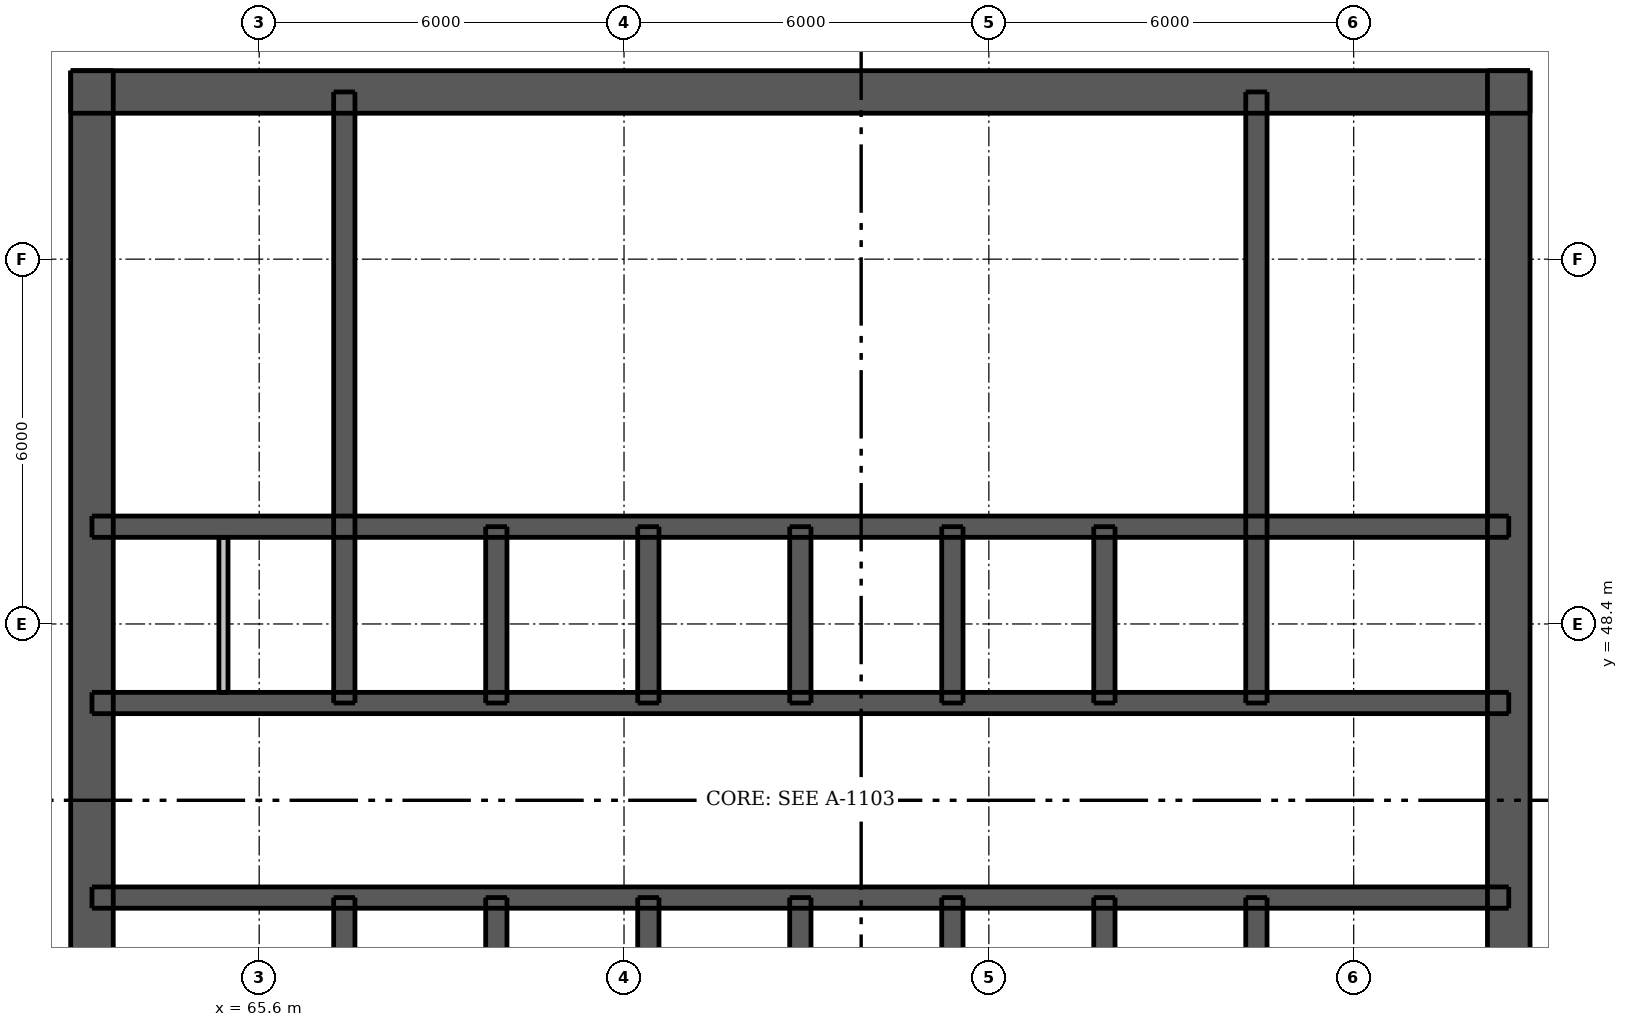
"""IFC4 building model, lengths in metres.
Left out: names, types, materials, properties, quantities, classifications, styles, units other than length and angle.
Written with IfcOpenShell. Run it as: python <this file> out.ifc"""

import sys

from ifc_helpers import new_model, si_unit, direction, frame, frame_2d, origin, place, context, subcontext, project, spatial, rectangle, extrude, element, fill, save


model = new_model("IFC4")
c1 = context("Model", 3, precision=1e-05, world=origin(), true_north=direction((0.0, 1.0)))
c2 = subcontext(c1, "Body", "Model", "MODEL_VIEW")
j1 = project(units=[si_unit("LENGTHUNIT", "METRE"), si_unit("PLANEANGLEUNIT", "RADIAN")], contexts=[c1])
p1 = place(None, origin())
s1 = spatial("IfcSite", under=j1, at=p1, CompositionType="ELEMENT")
p2 = place(p1, origin())
s2 = spatial("IfcBuilding", under=s1, at=p2, CompositionType="ELEMENT")
p3 = place(p2, frame((0.0, 0.0, 158.2)))
s3 = spatial("IfcBuildingStorey", under=s2, at=p3, CompositionType="ELEMENT", Elevation=158.2)
p4 = place(p3, frame((62.5, 57.15, 0.0), z_axis=(0.0, 0.0, 1.0), x_axis=(1.0, 0.0, 0.0)))
e1 = element("IfcWall", 1, at=p4, inside=s3, PredefinedType="SHEAR", context=c2, shape_type="SweptSolid", body=[
    extrude(rectangle(XDim=24.0, YDim=0.7, at=frame_2d((12.0, 0.0))), origin(), (0.0, 0.0, 1.0), 3.05),
])
p5 = place(p4, frame((20.938, 0.0, 0.0)))
e2 = element("IfcOpeningElement", 2, at=p5, cuts=e1, PredefinedType="OPENING", context=c2, shape_type="SweptSolid", body=[
    extrude(rectangle(XDim=1.1, YDim=2.1, at=frame_2d((0.55, 1.05))), frame((0.0, 0.36, 0.0), z_axis=(0.0, -1.0, 0.0), x_axis=(1.0, 0.0, 0.0)), (0.0, 0.0, 1.0), 0.72),
])
p6 = place(p4, frame((1.962, 0.0, 0.0)))
e3 = element("IfcOpeningElement", 3, at=p6, cuts=e1, PredefinedType="OPENING", context=c2, shape_type="SweptSolid", body=[
    extrude(rectangle(XDim=1.1, YDim=2.1, at=frame_2d((0.55, 1.05))), frame((0.0, 0.36, 0.0), z_axis=(0.0, -1.0, 0.0), x_axis=(1.0, 0.0, 0.0)), (0.0, 0.0, 1.0), 0.72),
])
p7 = place(p4, frame((11.55, 0.0, 0.0)))
e4 = element("IfcOpeningElement", 4, at=p7, cuts=e1, PredefinedType="OPENING", context=c2, shape_type="SweptSolid", body=[
    extrude(rectangle(XDim=0.9, YDim=2.1, at=frame_2d((0.45, 1.05))), frame((0.0, 0.36, 0.0), z_axis=(0.0, -1.0, 0.0), x_axis=(1.0, 0.0, 0.0)), (0.0, 0.0, 1.0), 0.72),
])
p8 = place(p3, frame((62.85, 33.5, 0.0), z_axis=(0.0, 0.0, 1.0), x_axis=(0.0, 1.0, 0.0)))
e5 = element("IfcWall", 5, at=p8, inside=s3, PredefinedType="SHEAR", context=c2, shape_type="SweptSolid", body=[
    extrude(rectangle(XDim=24.0, YDim=0.7, at=frame_2d((12.0, 0.0))), origin(), (0.0, 0.0, 1.0), 3.05),
])
p9 = place(p8, frame((11.2, 0.0, 0.0)))
e6 = element("IfcOpeningElement", 6, at=p9, cuts=e5, PredefinedType="OPENING", context=c2, shape_type="SweptSolid", body=[
    extrude(rectangle(XDim=1.6, YDim=2.1, at=frame_2d((0.8, 1.05))), frame((0.0, 0.36, 0.0), z_axis=(0.0, -1.0, 0.0), x_axis=(1.0, 0.0, 0.0)), (0.0, 0.0, 1.0), 0.72),
])
p10 = place(p3, frame((86.15, 33.5, 0.0), z_axis=(0.0, 0.0, 1.0), x_axis=(0.0, 1.0, 0.0)))
e7 = element("IfcWall", 7, at=p10, inside=s3, PredefinedType="SHEAR", context=c2, shape_type="SweptSolid", body=[
    extrude(rectangle(XDim=24.0, YDim=0.7, at=frame_2d((12.0, 0.0))), origin(), (0.0, 0.0, 1.0), 3.05),
])
p11 = place(p10, frame((11.2, 0.0, 0.0)))
e8 = element("IfcOpeningElement", 8, at=p11, cuts=e7, PredefinedType="OPENING", context=c2, shape_type="SweptSolid", body=[
    extrude(rectangle(XDim=1.6, YDim=2.1, at=frame_2d((0.8, 1.05))), frame((0.0, 0.36, 0.0), z_axis=(0.0, -1.0, 0.0), x_axis=(1.0, 0.0, 0.0)), (0.0, 0.0, 1.0), 0.72),
])
p12 = place(p3, frame((62.85, 43.9, 0.0), z_axis=(0.0, 0.0, 1.0), x_axis=(1.0, 0.0, 0.0)))
e9 = element("IfcWall", 9, at=p12, inside=s3, PredefinedType="SHEAR", context=c2, shape_type="SweptSolid", body=[
    extrude(rectangle(XDim=23.3, YDim=0.35, at=frame_2d((11.65, 0.0))), origin(), (0.0, 0.0, 1.0), 3.05),
])
p13 = place(p12, frame((1.712, 0.0, 0.0)))
e10 = element("IfcOpeningElement", 10, at=p13, cuts=e9, PredefinedType="OPENING", context=c2, shape_type="SweptSolid", body=[
    extrude(rectangle(XDim=0.9, YDim=2.1, at=frame_2d((0.45, 1.05))), frame((0.0, 0.185, 0.0), z_axis=(0.0, -1.0, 0.0), x_axis=(1.0, 0.0, 0.0)), (0.0, 0.0, 1.0), 0.37),
])
p14 = place(p12, frame((20.688, 0.0, 0.0)))
e11 = element("IfcOpeningElement", 11, at=p14, cuts=e9, PredefinedType="OPENING", context=c2, shape_type="SweptSolid", body=[
    extrude(rectangle(XDim=0.9, YDim=2.1, at=frame_2d((0.45, 1.05))), frame((0.0, 0.185, 0.0), z_axis=(0.0, -1.0, 0.0), x_axis=(1.0, 0.0, 0.0)), (0.0, 0.0, 1.0), 0.37),
])
p15 = place(p12, frame((4.95, 0.0, 0.0)))
e12 = element("IfcOpeningElement", 12, at=p15, cuts=e9, PredefinedType="OPENING", context=c2, shape_type="SweptSolid", body=[
    extrude(rectangle(XDim=0.9, YDim=2.1, at=frame_2d((0.45, 1.05))), frame((0.0, 0.185, 0.0), z_axis=(0.0, -1.0, 0.0), x_axis=(1.0, 0.0, 0.0)), (0.0, 0.0, 1.0), 0.37),
])
p16 = place(p12, frame((9.95, 0.0, 0.0)))
e13 = element("IfcOpeningElement", 13, at=p16, cuts=e9, PredefinedType="OPENING", context=c2, shape_type="SweptSolid", body=[
    extrude(rectangle(XDim=0.9, YDim=2.1, at=frame_2d((0.45, 1.05))), frame((0.0, 0.185, 0.0), z_axis=(0.0, -1.0, 0.0), x_axis=(1.0, 0.0, 0.0)), (0.0, 0.0, 1.0), 0.37),
])
p17 = place(p12, frame((12.45, 0.0, 0.0)))
e14 = element("IfcOpeningElement", 14, at=p17, cuts=e9, PredefinedType="OPENING", context=c2, shape_type="SweptSolid", body=[
    extrude(rectangle(XDim=0.9, YDim=2.1, at=frame_2d((0.45, 1.05))), frame((0.0, 0.185, 0.0), z_axis=(0.0, -1.0, 0.0), x_axis=(1.0, 0.0, 0.0)), (0.0, 0.0, 1.0), 0.37),
])
p18 = place(p12, frame((17.45, 0.0, 0.0)))
e15 = element("IfcOpeningElement", 15, at=p18, cuts=e9, PredefinedType="OPENING", context=c2, shape_type="SweptSolid", body=[
    extrude(rectangle(XDim=0.9, YDim=2.1, at=frame_2d((0.45, 1.05))), frame((0.0, 0.185, 0.0), z_axis=(0.0, -1.0, 0.0), x_axis=(1.0, 0.0, 0.0)), (0.0, 0.0, 1.0), 0.37),
])
p19 = place(p3, frame((62.85, 47.1, 0.0), z_axis=(0.0, 0.0, 1.0), x_axis=(1.0, 0.0, 0.0)))
e16 = element("IfcWall", 16, at=p19, inside=s3, PredefinedType="SHEAR", context=c2, shape_type="SweptSolid", body=[
    extrude(rectangle(XDim=23.3, YDim=0.35, at=frame_2d((11.65, 0.0))), origin(), (0.0, 0.0, 1.0), 3.05),
])
p20 = place(p19, frame((0.806, 0.0, 0.0)))
e17 = element("IfcOpeningElement", 17, at=p20, cuts=e16, PredefinedType="OPENING", context=c2, shape_type="SweptSolid", body=[
    extrude(rectangle(XDim=0.9, YDim=2.1, at=frame_2d((0.45, 1.05))), frame((0.0, 0.185, 0.0), z_axis=(0.0, -1.0, 0.0), x_axis=(1.0, 0.0, 0.0)), (0.0, 0.0, 1.0), 0.37),
])
p21 = place(p19, frame((2.619, 0.0, 0.0)))
e18 = element("IfcOpeningElement", 18, at=p21, cuts=e16, PredefinedType="OPENING", context=c2, shape_type="SweptSolid", body=[
    extrude(rectangle(XDim=0.9, YDim=2.1, at=frame_2d((0.45, 1.05))), frame((0.0, 0.185, 0.0), z_axis=(0.0, -1.0, 0.0), x_axis=(1.0, 0.0, 0.0)), (0.0, 0.0, 1.0), 0.37),
])
p22 = place(p19, frame((20.688, 0.0, 0.0)))
e19 = element("IfcOpeningElement", 19, at=p22, cuts=e16, PredefinedType="OPENING", context=c2, shape_type="SweptSolid", body=[
    extrude(rectangle(XDim=0.9, YDim=2.1, at=frame_2d((0.45, 1.05))), frame((0.0, 0.185, 0.0), z_axis=(0.0, -1.0, 0.0), x_axis=(1.0, 0.0, 0.0)), (0.0, 0.0, 1.0), 0.37),
])
p23 = place(p19, frame((4.85, 0.0, 0.0)))
e20 = element("IfcOpeningElement", 20, at=p23, cuts=e16, PredefinedType="OPENING", context=c2, shape_type="SweptSolid", body=[
    extrude(rectangle(XDim=1.1, YDim=2.1, at=frame_2d((0.55, 1.05))), frame((0.0, 0.185, 0.0), z_axis=(0.0, -1.0, 0.0), x_axis=(1.0, 0.0, 0.0)), (0.0, 0.0, 1.0), 0.37),
])
p24 = place(p19, frame((7.35, 0.0, 0.0)))
e21 = element("IfcOpeningElement", 21, at=p24, cuts=e16, PredefinedType="OPENING", context=c2, shape_type="SweptSolid", body=[
    extrude(rectangle(XDim=1.1, YDim=2.1, at=frame_2d((0.55, 1.05))), frame((0.0, 0.185, 0.0), z_axis=(0.0, -1.0, 0.0), x_axis=(1.0, 0.0, 0.0)), (0.0, 0.0, 1.0), 0.37),
])
p25 = place(p19, frame((9.85, 0.0, 0.0)))
e22 = element("IfcOpeningElement", 22, at=p25, cuts=e16, PredefinedType="OPENING", context=c2, shape_type="SweptSolid", body=[
    extrude(rectangle(XDim=1.1, YDim=2.1, at=frame_2d((0.55, 1.05))), frame((0.0, 0.185, 0.0), z_axis=(0.0, -1.0, 0.0), x_axis=(1.0, 0.0, 0.0)), (0.0, 0.0, 1.0), 0.37),
])
p26 = place(p19, frame((12.35, 0.0, 0.0)))
e23 = element("IfcOpeningElement", 23, at=p26, cuts=e16, PredefinedType="OPENING", context=c2, shape_type="SweptSolid", body=[
    extrude(rectangle(XDim=1.1, YDim=2.1, at=frame_2d((0.55, 1.05))), frame((0.0, 0.185, 0.0), z_axis=(0.0, -1.0, 0.0), x_axis=(1.0, 0.0, 0.0)), (0.0, 0.0, 1.0), 0.37),
])
p27 = place(p19, frame((14.85, 0.0, 0.0)))
e24 = element("IfcOpeningElement", 24, at=p27, cuts=e16, PredefinedType="OPENING", context=c2, shape_type="SweptSolid", body=[
    extrude(rectangle(XDim=1.1, YDim=2.1, at=frame_2d((0.55, 1.05))), frame((0.0, 0.185, 0.0), z_axis=(0.0, -1.0, 0.0), x_axis=(1.0, 0.0, 0.0)), (0.0, 0.0, 1.0), 0.37),
])
p28 = place(p19, frame((17.35, 0.0, 0.0)))
e25 = element("IfcOpeningElement", 25, at=p28, cuts=e16, PredefinedType="OPENING", context=c2, shape_type="SweptSolid", body=[
    extrude(rectangle(XDim=1.1, YDim=2.1, at=frame_2d((0.55, 1.05))), frame((0.0, 0.185, 0.0), z_axis=(0.0, -1.0, 0.0), x_axis=(1.0, 0.0, 0.0)), (0.0, 0.0, 1.0), 0.37),
])
p29 = place(p3, frame((62.85, 50.0, 0.0), z_axis=(0.0, 0.0, 1.0), x_axis=(1.0, 0.0, 0.0)))
e26 = element("IfcWall", 26, at=p29, inside=s3, PredefinedType="SHEAR", context=c2, shape_type="SweptSolid", body=[
    extrude(rectangle(XDim=23.3, YDim=0.35, at=frame_2d((11.65, 0.0))), origin(), (0.0, 0.0, 1.0), 3.05),
])
p30 = place(p3, frame((67.0, 33.85, 0.0), z_axis=(0.0, 0.0, 1.0), x_axis=(0.0, 1.0, 0.0)))
e27 = element("IfcWall", 27, at=p30, inside=s3, PredefinedType="SHEAR", context=c2, shape_type="SweptSolid", body=[
    extrude(rectangle(XDim=10.05, YDim=0.35, at=frame_2d((5.025, 0.0))), origin(), (0.0, 0.0, 1.0), 3.05),
])
p31 = place(p30, frame((0.55, 0.0, 0.0)))
e28 = element("IfcOpeningElement", 28, at=p31, cuts=e27, PredefinedType="OPENING", context=c2, shape_type="SweptSolid", body=[
    extrude(rectangle(XDim=1.1, YDim=2.1, at=frame_2d((0.55, 1.05))), frame((0.0, 0.185, 0.0), z_axis=(0.0, -1.0, 0.0), x_axis=(1.0, 0.0, 0.0)), (0.0, 0.0, 1.0), 0.37),
])
for number, where, z_axis, x_axis in (
    (29, (67.0, 47.1, 0.0), (0.0, 0.0, 1.0), (0.0, 1.0, 0.0)),
    (30, (82.0, 33.85, 0.0), (0.0, 0.0, 1.0), (0.0, 1.0, 0.0)),
    (31, (82.0, 47.1, 0.0), (0.0, 0.0, 1.0), (0.0, 1.0, 0.0)),
):
    element("IfcWall", number, at=place(p3, frame(where, z_axis=z_axis, x_axis=x_axis)), inside=s3, PredefinedType="SHEAR", context=c2, shape_type="SweptSolid", body=[
        extrude(rectangle(XDim=10.05, YDim=0.35, at=frame_2d((5.025, 0.0))), origin(), (0.0, 0.0, 1.0), 3.05),
    ])
for number, where, z_axis, x_axis in (
    (32, (69.5, 41.0, 0.0), (0.0, 0.0, 1.0), (0.0, 1.0, 0.0)),
    (33, (69.5, 47.1, 0.0), (0.0, 0.0, 1.0), (0.0, 1.0, 0.0)),
    (34, (72.0, 41.0, 0.0), (0.0, 0.0, 1.0), (0.0, 1.0, 0.0)),
    (35, (72.0, 47.1, 0.0), (0.0, 0.0, 1.0), (0.0, 1.0, 0.0)),
    (36, (74.5, 41.0, 0.0), (0.0, 0.0, 1.0), (0.0, 1.0, 0.0)),
    (37, (74.5, 47.1, 0.0), (0.0, 0.0, 1.0), (0.0, 1.0, 0.0)),
    (38, (77.0, 41.0, 0.0), (0.0, 0.0, 1.0), (0.0, 1.0, 0.0)),
    (39, (77.0, 47.1, 0.0), (0.0, 0.0, 1.0), (0.0, 1.0, 0.0)),
    (40, (79.5, 41.0, 0.0), (0.0, 0.0, 1.0), (0.0, 1.0, 0.0)),
    (41, (79.5, 47.1, 0.0), (0.0, 0.0, 1.0), (0.0, 1.0, 0.0)),
):
    element("IfcWall", number, at=place(p3, frame(where, z_axis=z_axis, x_axis=x_axis)), inside=s3, PredefinedType="SHEAR", context=c2, shape_type="SweptSolid", body=[
        extrude(rectangle(XDim=2.9, YDim=0.35, at=frame_2d((1.45, 0.0))), origin(), (0.0, 0.0, 1.0), 3.05),
    ])
p32 = place(p3, frame((65.012, 47.275, 0.0), z_axis=(0.0, 0.0, 1.0), x_axis=(0.0, 1.0, 0.0)))
e42 = element("IfcWall", 42, at=p32, inside=s3, PredefinedType="PLUMBINGWALL", context=c2, shape_type="SweptSolid", body=[
    extrude(rectangle(XDim=2.55, YDim=0.15, at=frame_2d((1.275, 0.0))), origin(), (0.0, 0.0, 1.0), 3.05),
])
p33 = place(p5, origin())
e43 = element("IfcDoor", 43, at=p33, inside=s3, OperationType="SINGLE_SWING_RIGHT", PredefinedType="DOOR", context=c2, shape_type="SweptSolid", body=[
    extrude(rectangle(XDim=1.1, YDim=2.1, at=frame_2d((0.55, 1.05))), frame((0.0, -0.288, 0.0), z_axis=(0.0, -1.0, 0.0), x_axis=(1.0, 0.0, 0.0)), (0.0, 0.0, 1.0), 0.05),
])
fill(e2, e43)
p34 = place(p6, origin())
e44 = element("IfcDoor", 44, at=p34, inside=s3, OperationType="SINGLE_SWING_LEFT", PredefinedType="DOOR", context=c2, shape_type="SweptSolid", body=[
    extrude(rectangle(XDim=1.1, YDim=2.1, at=frame_2d((0.55, 1.05))), frame((0.0, -0.288, 0.0), z_axis=(0.0, -1.0, 0.0), x_axis=(1.0, 0.0, 0.0)), (0.0, 0.0, 1.0), 0.05),
])
fill(e3, e44)
p35 = place(p9, origin())
e45 = element("IfcDoor", 45, at=p35, inside=s3, OperationType="DOUBLE_DOOR_SINGLE_SWING", PredefinedType="DOOR", context=c2, shape_type="SweptSolid", body=[
    extrude(rectangle(XDim=1.6, YDim=2.1, at=frame_2d((0.8, 1.05))), frame((0.0, -0.288, 0.0), z_axis=(0.0, -1.0, 0.0), x_axis=(1.0, 0.0, 0.0)), (0.0, 0.0, 1.0), 0.05),
])
fill(e6, e45)
p36 = place(p11, origin())
e46 = element("IfcDoor", 46, at=p36, inside=s3, OperationType="DOUBLE_DOOR_SINGLE_SWING", PredefinedType="DOOR", context=c2, shape_type="SweptSolid", body=[
    extrude(rectangle(XDim=1.6, YDim=2.1, at=frame_2d((0.8, 1.05))), frame((0.0, 0.337, 0.0), z_axis=(0.0, -1.0, 0.0), x_axis=(1.0, 0.0, 0.0)), (0.0, 0.0, 1.0), 0.05),
])
fill(e8, e46)
p37 = place(p13, origin())
e47 = element("IfcDoor", 47, at=p37, inside=s3, OperationType="SINGLE_SWING_LEFT", PredefinedType="DOOR", context=c2, shape_type="SweptSolid", body=[
    extrude(rectangle(XDim=0.9, YDim=2.1, at=frame_2d((0.45, 1.05))), frame((0.0, -0.112, 0.0), z_axis=(0.0, -1.0, 0.0), x_axis=(1.0, 0.0, 0.0)), (0.0, 0.0, 1.0), 0.05),
])
fill(e10, e47)
p38 = place(p14, origin())
e48 = element("IfcDoor", 48, at=p38, inside=s3, OperationType="SINGLE_SWING_LEFT", PredefinedType="DOOR", context=c2, shape_type="SweptSolid", body=[
    extrude(rectangle(XDim=0.9, YDim=2.1, at=frame_2d((0.45, 1.05))), frame((0.0, -0.112, 0.0), z_axis=(0.0, -1.0, 0.0), x_axis=(1.0, 0.0, 0.0)), (0.0, 0.0, 1.0), 0.05),
])
fill(e11, e48)
p39 = place(p20, origin())
e49 = element("IfcDoor", 49, at=p39, inside=s3, OperationType="SINGLE_SWING_LEFT", PredefinedType="DOOR", context=c2, shape_type="SweptSolid", body=[
    extrude(rectangle(XDim=0.9, YDim=2.1, at=frame_2d((0.45, 1.05))), frame((0.0, 0.163, 0.0), z_axis=(0.0, -1.0, 0.0), x_axis=(1.0, 0.0, 0.0)), (0.0, 0.0, 1.0), 0.05),
])
fill(e17, e49)
p40 = place(p21, origin())
e50 = element("IfcDoor", 50, at=p40, inside=s3, OperationType="SINGLE_SWING_RIGHT", PredefinedType="DOOR", context=c2, shape_type="SweptSolid", body=[
    extrude(rectangle(XDim=0.9, YDim=2.1, at=frame_2d((0.45, 1.05))), frame((0.0, 0.163, 0.0), z_axis=(0.0, -1.0, 0.0), x_axis=(1.0, 0.0, 0.0)), (0.0, 0.0, 1.0), 0.05),
])
fill(e18, e50)
p41 = place(p22, origin())
e51 = element("IfcDoor", 51, at=p41, inside=s3, OperationType="SINGLE_SWING_LEFT", PredefinedType="DOOR", context=c2, shape_type="SweptSolid", body=[
    extrude(rectangle(XDim=0.9, YDim=2.1, at=frame_2d((0.45, 1.05))), frame((0.0, 0.163, 0.0), z_axis=(0.0, -1.0, 0.0), x_axis=(1.0, 0.0, 0.0)), (0.0, 0.0, 1.0), 0.05),
])
fill(e19, e51)
p42 = place(p7, origin())
e52 = element("IfcDoor", 52, at=p42, inside=s3, OperationType="SINGLE_SWING_RIGHT", PredefinedType="DOOR", context=c2, shape_type="SweptSolid", body=[
    extrude(rectangle(XDim=0.9, YDim=2.1, at=frame_2d((0.45, 1.05))), frame((0.0, -0.288, 0.0), z_axis=(0.0, -1.0, 0.0), x_axis=(1.0, 0.0, 0.0)), (0.0, 0.0, 1.0), 0.05),
])
fill(e4, e52)
p43 = place(p15, origin())
e53 = element("IfcDoor", 53, at=p43, inside=s3, OperationType="SINGLE_SWING_RIGHT", PredefinedType="DOOR", context=c2, shape_type="SweptSolid", body=[
    extrude(rectangle(XDim=0.9, YDim=2.1, at=frame_2d((0.45, 1.05))), frame((0.0, -0.112, 0.0), z_axis=(0.0, -1.0, 0.0), x_axis=(1.0, 0.0, 0.0)), (0.0, 0.0, 1.0), 0.05),
])
fill(e12, e53)
p44 = place(p16, origin())
e54 = element("IfcDoor", 54, at=p44, inside=s3, OperationType="SINGLE_SWING_RIGHT", PredefinedType="DOOR", context=c2, shape_type="SweptSolid", body=[
    extrude(rectangle(XDim=0.9, YDim=2.1, at=frame_2d((0.45, 1.05))), frame((0.0, -0.112, 0.0), z_axis=(0.0, -1.0, 0.0), x_axis=(1.0, 0.0, 0.0)), (0.0, 0.0, 1.0), 0.05),
])
fill(e13, e54)
p45 = place(p17, origin())
e55 = element("IfcDoor", 55, at=p45, inside=s3, OperationType="SINGLE_SWING_LEFT", PredefinedType="DOOR", context=c2, shape_type="SweptSolid", body=[
    extrude(rectangle(XDim=0.9, YDim=2.1, at=frame_2d((0.45, 1.05))), frame((0.0, -0.112, 0.0), z_axis=(0.0, -1.0, 0.0), x_axis=(1.0, 0.0, 0.0)), (0.0, 0.0, 1.0), 0.05),
])
fill(e14, e55)
p46 = place(p18, origin())
e56 = element("IfcDoor", 56, at=p46, inside=s3, OperationType="SINGLE_SWING_LEFT", PredefinedType="DOOR", context=c2, shape_type="SweptSolid", body=[
    extrude(rectangle(XDim=0.9, YDim=2.1, at=frame_2d((0.45, 1.05))), frame((0.0, -0.112, 0.0), z_axis=(0.0, -1.0, 0.0), x_axis=(1.0, 0.0, 0.0)), (0.0, 0.0, 1.0), 0.05),
])
fill(e15, e56)
p47 = place(p23, origin())
e57 = element("IfcDoor", 57, at=p47, inside=s3, OperationType="DOUBLE_DOOR_SLIDING", PredefinedType="DOOR", context=c2, shape_type="SweptSolid", body=[
    extrude(rectangle(XDim=1.1, YDim=2.1, at=frame_2d((0.55, 1.05))), frame((0.0, 0.025, 0.0), z_axis=(0.0, -1.0, 0.0), x_axis=(1.0, 0.0, 0.0)), (0.0, 0.0, 1.0), 0.05),
])
fill(e20, e57)
p48 = place(p24, origin())
e58 = element("IfcDoor", 58, at=p48, inside=s3, OperationType="DOUBLE_DOOR_SLIDING", PredefinedType="DOOR", context=c2, shape_type="SweptSolid", body=[
    extrude(rectangle(XDim=1.1, YDim=2.1, at=frame_2d((0.55, 1.05))), frame((0.0, 0.025, 0.0), z_axis=(0.0, -1.0, 0.0), x_axis=(1.0, 0.0, 0.0)), (0.0, 0.0, 1.0), 0.05),
])
fill(e21, e58)
p49 = place(p25, origin())
e59 = element("IfcDoor", 59, at=p49, inside=s3, OperationType="DOUBLE_DOOR_SLIDING", PredefinedType="DOOR", context=c2, shape_type="SweptSolid", body=[
    extrude(rectangle(XDim=1.1, YDim=2.1, at=frame_2d((0.55, 1.05))), frame((0.0, 0.025, 0.0), z_axis=(0.0, -1.0, 0.0), x_axis=(1.0, 0.0, 0.0)), (0.0, 0.0, 1.0), 0.05),
])
fill(e22, e59)
p50 = place(p26, origin())
e60 = element("IfcDoor", 60, at=p50, inside=s3, OperationType="DOUBLE_DOOR_SLIDING", PredefinedType="DOOR", context=c2, shape_type="SweptSolid", body=[
    extrude(rectangle(XDim=1.1, YDim=2.1, at=frame_2d((0.55, 1.05))), frame((0.0, 0.025, 0.0), z_axis=(0.0, -1.0, 0.0), x_axis=(1.0, 0.0, 0.0)), (0.0, 0.0, 1.0), 0.05),
])
fill(e23, e60)
p51 = place(p27, origin())
e61 = element("IfcDoor", 61, at=p51, inside=s3, OperationType="DOUBLE_DOOR_SLIDING", PredefinedType="DOOR", context=c2, shape_type="SweptSolid", body=[
    extrude(rectangle(XDim=1.1, YDim=2.1, at=frame_2d((0.55, 1.05))), frame((0.0, 0.025, 0.0), z_axis=(0.0, -1.0, 0.0), x_axis=(1.0, 0.0, 0.0)), (0.0, 0.0, 1.0), 0.05),
])
fill(e24, e61)
p52 = place(p28, origin())
e62 = element("IfcDoor", 62, at=p52, inside=s3, OperationType="DOUBLE_DOOR_SLIDING", PredefinedType="DOOR", context=c2, shape_type="SweptSolid", body=[
    extrude(rectangle(XDim=1.1, YDim=2.1, at=frame_2d((0.55, 1.05))), frame((0.0, 0.025, 0.0), z_axis=(0.0, -1.0, 0.0), x_axis=(1.0, 0.0, 0.0)), (0.0, 0.0, 1.0), 0.05),
])
fill(e25, e62)
save(model, sys.argv[1])
